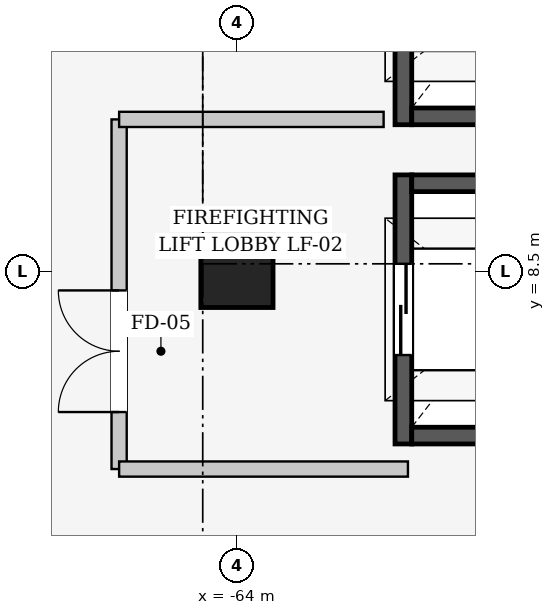
"""IFC4 building model, lengths in metres.
Left out: names, types, materials, properties, quantities, classifications, styles, units other than length and angle.
Written with IfcOpenShell. Run it as: python <this file> out.ifc"""

import sys

from ifc_helpers import new_model, si_unit, direction, frame, frame_2d, origin, origin_2d, place, context, subcontext, project, spatial, rectangle, extrude, element, fill, save


model = new_model("IFC4")
c1 = context("Model", 3, precision=1e-05, world=origin(), true_north=direction((0.0, 1.0)))
c2 = subcontext(c1, "Body", "Model", "MODEL_VIEW")
j1 = project(units=[si_unit("LENGTHUNIT", "METRE"), si_unit("PLANEANGLEUNIT", "RADIAN")], contexts=[c1])
p1 = place(None, origin())
s1 = spatial("IfcSite", under=j1, at=p1, CompositionType="ELEMENT")
p2 = place(p1, origin())
s2 = spatial("IfcBuilding", under=s1, at=p2, CompositionType="ELEMENT")
p3 = place(p2, frame((0.0, 0.0, 6.0)))
s3 = spatial("IfcBuildingStorey", under=s2, at=p3, CompositionType="ELEMENT", Elevation=6.0)
p4 = place(p3, frame((-64.0, 8.5, 0.0), z_axis=(0.0, 0.0, 1.0), x_axis=(1.0, 0.0, 0.0)))
e1 = element("IfcColumn", 1, at=p4, inside=s3, PredefinedType="COLUMN", context=c2, shape_type="SweptSolid", body=[
    extrude(rectangle(XDim=0.95, YDim=0.95, at=origin_2d()), origin(), (0.0, 0.0, 1.0), 5.4),
])
p5 = place(p3, frame((-61.81, 6.23, 0.0), z_axis=(0.0, 0.0, 1.0), x_axis=(0.0, 1.0, 0.0)))
e2 = element("IfcWall", 2, at=p5, inside=s3, PredefinedType="SHEAR", context=c2, shape_type="SweptSolid", body=[
    extrude(rectangle(XDim=3.54, YDim=0.22, at=frame_2d((1.77, 0.0))), origin(), (0.0, 0.0, 1.0), 5.4),
])
p6 = place(p5, frame((1.17, 0.0, 0.0)))
e3 = element("IfcOpeningElement", 3, at=p6, cuts=e2, PredefinedType="OPENING", context=c2, shape_type="SweptSolid", body=[
    extrude(rectangle(XDim=1.2, YDim=2.2, at=frame_2d((0.6, 1.1))), frame((0.0, 0.12, 0.0), z_axis=(0.0, -1.0, 0.0), x_axis=(1.0, 0.0, 0.0)), (0.0, 0.0, 1.0), 0.24),
])
for number, where, z_axis, x_axis in (
    (4, (-61.7, 9.66, 0.0), (0.0, 0.0, 1.0), (1.0, 0.0, 0.0)),
    (5, (-59.3, 6.34, 0.0), (0.0, 0.0, 1.0), (-1.0, 0.0, 0.0)),
):
    element("IfcWall", number, at=place(p3, frame(where, z_axis=z_axis, x_axis=x_axis)), inside=s3, PredefinedType="SHEAR", context=c2, shape_type="SweptSolid", body=[
        extrude(rectangle(XDim=2.4, YDim=0.22, at=frame_2d((1.2, 0.0))), origin(), (0.0, 0.0, 1.0), 5.4),
    ])
p7 = place(p3, frame((-61.81, 10.43, 0.0), z_axis=(0.0, 0.0, 1.0), x_axis=(0.0, 1.0, 0.0)))
e6 = element("IfcWall", 6, at=p7, inside=s3, PredefinedType="SHEAR", context=c2, shape_type="SweptSolid", body=[
    extrude(rectangle(XDim=3.54, YDim=0.22, at=frame_2d((1.77, 0.0))), origin(), (0.0, 0.0, 1.0), 5.4),
])
p8 = place(p7, frame((1.22, 0.0, 0.0)))
e7 = element("IfcOpeningElement", 7, at=p8, cuts=e6, PredefinedType="OPENING", context=c2, shape_type="SweptSolid", body=[
    extrude(rectangle(XDim=1.1, YDim=2.2, at=frame_2d((0.55, 1.1))), frame((0.0, 0.12, 0.0), z_axis=(0.0, -1.0, 0.0), x_axis=(1.0, 0.0, 0.0)), (0.0, 0.0, 1.0), 0.24),
])
p9 = place(p3, frame((-59.3, 10.54, 0.0), z_axis=(0.0, 0.0, 1.0), x_axis=(-1.0, 0.0, 0.0)))
e8 = element("IfcWall", 8, at=p9, inside=s3, PredefinedType="SHEAR", context=c2, shape_type="SweptSolid", body=[
    extrude(rectangle(XDim=2.4, YDim=0.22, at=frame_2d((1.2, 0.0))), origin(), (0.0, 0.0, 1.0), 5.4),
])
p10 = place(p3, frame((-65.55, 5.9, 0.0), z_axis=(0.0, 0.0, 1.0), x_axis=(0.0, 1.0, 0.0)))
e9 = element("IfcWall", 9, at=p10, inside=s3, PredefinedType="PARTITIONING", context=c2, shape_type="SweptSolid", body=[
    extrude(rectangle(XDim=4.6, YDim=0.2, at=frame_2d((2.3, 0.0))), origin(), (0.0, 0.0, 1.0), 4.145),
])
p11 = place(p10, frame((0.75, 0.0, 0.0)))
e10 = element("IfcOpeningElement", 10, at=p11, cuts=e9, PredefinedType="OPENING", context=c2, shape_type="SweptSolid", body=[
    extrude(rectangle(XDim=1.6, YDim=2.2, at=frame_2d((0.8, 1.1))), frame((0.0, 0.11, 0.0), z_axis=(0.0, -1.0, 0.0), x_axis=(1.0, 0.0, 0.0)), (0.0, 0.0, 1.0), 0.22),
])
p12 = place(p3, frame((-65.55, 10.5, 0.0), z_axis=(0.0, 0.0, 1.0), x_axis=(1.0, 0.0, 0.0)))
e11 = element("IfcWall", 11, at=p12, inside=s3, PredefinedType="PARTITIONING", context=c2, shape_type="SweptSolid", body=[
    extrude(rectangle(XDim=3.48, YDim=0.2, at=frame_2d((1.74, 0.0))), origin(), (0.0, 0.0, 1.0), 4.445),
])
p13 = place(p3, frame((-61.75, 5.9, 0.0), z_axis=(0.0, 0.0, 1.0), x_axis=(-1.0, 0.0, 0.0)))
e12 = element("IfcWall", 12, at=p13, inside=s3, PredefinedType="PARTITIONING", context=c2, shape_type="SweptSolid", body=[
    extrude(rectangle(XDim=3.8, YDim=0.2, at=frame_2d((1.9, 0.0))), origin(), (0.0, 0.0, 1.0), 4.445),
])
p14 = place(p6, origin())
e13 = element("IfcDoor", 13, at=p14, inside=s3, OperationType="SLIDING_TO_LEFT", PredefinedType="DOOR", context=c2, shape_type="SweptSolid", body=[
    extrude(rectangle(XDim=1.2, YDim=2.2, at=frame_2d((0.6, 1.1))), frame((0.0, 0.025, 0.0), z_axis=(0.0, -1.0, 0.0), x_axis=(1.0, 0.0, 0.0)), (0.0, 0.0, 1.0), 0.05),
])
fill(e3, e13)
p15 = place(p11, origin())
e14 = element("IfcDoor", 14, at=p15, inside=s3, OperationType="DOUBLE_DOOR_SINGLE_SWING", PredefinedType="DOOR", context=c2, shape_type="SweptSolid", body=[
    extrude(rectangle(XDim=1.6, YDim=2.2, at=frame_2d((0.8, 1.1))), frame((0.0, 0.025, 0.0), z_axis=(0.0, -1.0, 0.0), x_axis=(1.0, 0.0, 0.0)), (0.0, 0.0, 1.0), 0.05),
])
fill(e10, e14)
save(model, sys.argv[1])
